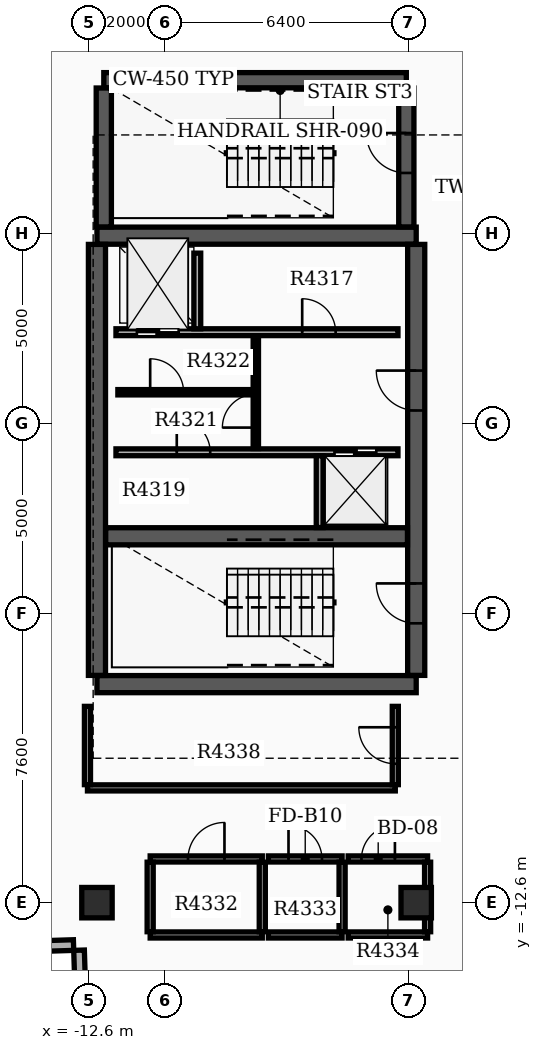
"""IFC4 building model, lengths in metres.
Left out: names, types, materials, properties, quantities, classifications, styles, units other than length and angle.
Written with IfcOpenShell. Run it as: python <this file> out.ifc"""

import sys

from ifc_helpers import new_model, si_unit, direction, frame, frame_2d, origin, origin_2d, place, context, subcontext, project, spatial, rectangle, extrude, element, fill, save


model = new_model("IFC4")
c1 = context("Model", 3, precision=1e-05, world=origin(), true_north=direction((0.0, 1.0)))
c2 = subcontext(c1, "Body", "Model", "MODEL_VIEW")
j1 = project(units=[si_unit("LENGTHUNIT", "METRE"), si_unit("PLANEANGLEUNIT", "RADIAN")], contexts=[c1])
p1 = place(None, origin())
s1 = spatial("IfcSite", under=j1, at=p1, CompositionType="ELEMENT")
p2 = place(p1, origin())
s2 = spatial("IfcBuilding", under=s1, at=p2, CompositionType="ELEMENT")
p3 = place(p2, frame((0.0, 0.0, 273.3)))
s3 = spatial("IfcBuildingStorey", under=s2, at=p3, CompositionType="ELEMENT", Elevation=273.3)
for number, where, z_axis, x_axis in (
    (1, (-12.4, -6.85, 0.0), (0.0, 0.0, 1.0), (1.0, 0.0, 0.0)),
    (2, (-12.4, 4.95, 0.0), (0.0, 0.0, 1.0), (1.0, 0.0, 0.0)),
):
    element("IfcWall", number, at=place(p3, frame(where, z_axis=z_axis, x_axis=x_axis)), inside=s3, PredefinedType="SHEAR", context=c2, shape_type="SweptSolid", body=[
        extrude(rectangle(XDim=8.4, YDim=0.45, at=frame_2d((4.2, 0.0))), origin(), (0.0, 0.0, 1.0), 3.7),
    ])
p4 = place(p3, frame((-12.4, -6.62, 0.0), z_axis=(0.0, 0.0, 1.0), x_axis=(0.0, 1.0, 0.0)))
e3 = element("IfcWall", 3, at=p4, inside=s3, PredefinedType="SHEAR", context=c2, shape_type="SweptSolid", body=[
    extrude(rectangle(XDim=11.34, YDim=0.45, at=frame_2d((5.67, 0.0))), origin(), (0.0, 0.0, 1.0), 3.7),
])
p5 = place(p3, frame((-4.0, -6.62, 0.0), z_axis=(0.0, 0.0, 1.0), x_axis=(0.0, 1.0, 0.0)))
e4 = element("IfcWall", 4, at=p5, inside=s3, PredefinedType="SHEAR", context=c2, shape_type="SweptSolid", body=[
    extrude(rectangle(XDim=11.34, YDim=0.45, at=frame_2d((5.67, 0.0))), origin(), (0.0, 0.0, 1.0), 3.7),
])
p6 = place(p5, frame((1.37, 0.0, 0.0)))
e5 = element("IfcOpeningElement", 5, at=p6, cuts=e4, PredefinedType="OPENING", context=c2, shape_type="SweptSolid", body=[
    extrude(rectangle(XDim=1.05, YDim=2.15, at=frame_2d((0.525, 1.075))), frame((0.0, 0.235, 0.0), z_axis=(0.0, -1.0, 0.0), x_axis=(1.0, 0.0, 0.0)), (0.0, 0.0, 1.0), 0.47),
])
p7 = place(p5, frame((6.97, 0.0, 0.0)))
e6 = element("IfcOpeningElement", 6, at=p7, cuts=e4, PredefinedType="OPENING", context=c2, shape_type="SweptSolid", body=[
    extrude(rectangle(XDim=1.05, YDim=2.15, at=frame_2d((0.525, 1.075))), frame((0.0, 0.235, 0.0), z_axis=(0.0, -1.0, 0.0), x_axis=(1.0, 0.0, 0.0)), (0.0, 0.0, 1.0), 0.47),
])
p8 = place(p3, frame((-12.17, -2.96, 0.0), z_axis=(0.0, 0.0, 1.0), x_axis=(1.0, 0.0, 0.0)))
e7 = element("IfcWall", 7, at=p8, inside=s3, PredefinedType="SHEAR", context=c2, shape_type="SweptSolid", body=[
    extrude(rectangle(XDim=7.94, YDim=0.45, at=frame_2d((3.97, 0.0))), origin(), (0.0, 0.0, 1.0), 3.7),
])
p9 = place(p3, frame((-12.22, 9.04, 0.0), z_axis=(0.0, 0.0, 1.0), x_axis=(1.0, 0.0, 0.0)))
e8 = element("IfcWall", 8, at=p9, inside=s3, PredefinedType="SHEAR", context=c2, shape_type="SweptSolid", body=[
    extrude(rectangle(XDim=7.96, YDim=0.4, at=frame_2d((3.98, 0.0))), origin(), (0.0, 0.0, 1.0), 3.7),
])
p10 = place(p3, frame((-12.22, 5.18, 0.0), z_axis=(0.0, 0.0, 1.0), x_axis=(0.0, 1.0, 0.0)))
e9 = element("IfcWall", 9, at=p10, inside=s3, PredefinedType="SHEAR", context=c2, shape_type="SweptSolid", body=[
    extrude(rectangle(XDim=3.655, YDim=0.4, at=frame_2d((1.828, 0.0))), origin(), (0.0, 0.0, 1.0), 3.7),
])
p11 = place(p3, frame((-4.26, 5.18, 0.0), z_axis=(0.0, 0.0, 1.0), x_axis=(0.0, 1.0, 0.0)))
e10 = element("IfcWall", 10, at=p11, inside=s3, PredefinedType="SHEAR", context=c2, shape_type="SweptSolid", body=[
    extrude(rectangle(XDim=3.655, YDim=0.4, at=frame_2d((1.828, 0.0))), origin(), (0.0, 0.0, 1.0), 3.7),
])
p12 = place(p11, frame((1.42, 0.0, 0.0)))
e11 = element("IfcOpeningElement", 11, at=p12, cuts=e10, PredefinedType="OPENING", context=c2, shape_type="SweptSolid", body=[
    extrude(rectangle(XDim=1.05, YDim=2.15, at=frame_2d((0.525, 1.075))), frame((0.0, 0.21, 0.0), z_axis=(0.0, -1.0, 0.0), x_axis=(1.0, 0.0, 0.0)), (0.0, 0.0, 1.0), 0.42),
])
for number, where, z_axis, x_axis in (
    (12, (-12.4, -12.6, 0.0), (0.0, 0.0, 1.0), (1.0, 0.0, 0.0)),
    (13, (-4.0, -12.6, 0.0), (0.0, 0.0, 1.0), (1.0, 0.0, 0.0)),
):
    element("IfcColumn", number, at=place(p3, frame(where, z_axis=z_axis, x_axis=x_axis)), inside=s3, PredefinedType="COLUMN", context=c2, shape_type="SweptSolid", body=[
        extrude(rectangle(XDim=0.8, YDim=0.8, at=origin_2d()), origin(), (0.0, 0.0, 1.0), 3.9),
    ])
p13 = place(p3, frame((-14.235, -13.754, 0.0), z_axis=(0.0, 0.0, 1.0), x_axis=(0.999506398264, 0.031415916822, 0.0)))
e14 = element("IfcWall", 14, at=p13, inside=s3, PredefinedType="STANDARD", context=c2, shape_type="SweptSolid", body=[
    extrude(rectangle(XDim=1.22, YDim=0.28, at=frame_2d((0.61, 0.0))), origin(), (0.0, 0.0, 1.0), 3.18),
])
p14 = place(p3, frame((-12.871, -13.851, 0.0), z_axis=(0.0, 0.0, 1.0), x_axis=(0.031412596484, -0.999506502621, 0.0)))
e15 = element("IfcWall", 15, at=p14, inside=s3, PredefinedType="STANDARD", context=c2, shape_type="SweptSolid", body=[
    extrude(rectangle(XDim=1.5, YDim=0.28, at=frame_2d((0.75, 0.0))), origin(), (0.0, 0.0, 1.0), 3.18),
])
p15 = place(p3, frame((-11.9, 2.41, 0.0), z_axis=(0.0, 0.0, 1.0), x_axis=(1.0, 0.0, 0.0)))
e16 = element("IfcWall", 16, at=p15, inside=s3, PredefinedType="SOLIDWALL", context=c2, shape_type="SweptSolid", body=[
    extrude(rectangle(XDim=7.42, YDim=0.18, at=frame_2d((3.71, 0.0))), origin(), (0.0, 0.0, 1.0), 3.17),
])
p16 = place(p15, frame((0.55, 0.0, 0.0)))
e17 = element("IfcOpeningElement", 17, at=p16, cuts=e16, PredefinedType="OPENING", context=c2, shape_type="SweptSolid", body=[
    extrude(rectangle(XDim=1.1, YDim=2.15, at=frame_2d((0.55, 1.075))), frame((0.0, 0.1, 0.0), z_axis=(0.0, -1.0, 0.0), x_axis=(1.0, 0.0, 0.0)), (0.0, 0.0, 1.0), 0.2),
])
p17 = place(p15, frame((4.9, 0.0, 0.0)))
e18 = element("IfcOpeningElement", 18, at=p17, cuts=e16, PredefinedType="OPENING", context=c2, shape_type="SweptSolid", body=[
    extrude(rectangle(XDim=0.88, YDim=2.1, at=frame_2d((0.44, 1.05))), frame((0.0, 0.1, 0.0), z_axis=(0.0, -1.0, 0.0), x_axis=(1.0, 0.0, 0.0)), (0.0, 0.0, 1.0), 0.2),
])
p18 = place(p3, frame((-11.9, -0.75, 0.0), z_axis=(0.0, 0.0, 1.0), x_axis=(1.0, 0.0, 0.0)))
e19 = element("IfcWall", 19, at=p18, inside=s3, PredefinedType="SOLIDWALL", context=c2, shape_type="SweptSolid", body=[
    extrude(rectangle(XDim=7.42, YDim=0.18, at=frame_2d((3.71, 0.0))), origin(), (0.0, 0.0, 1.0), 3.17),
])
p19 = place(p18, frame((5.75, 0.0, 0.0)))
e20 = element("IfcOpeningElement", 20, at=p19, cuts=e19, PredefinedType="OPENING", context=c2, shape_type="SweptSolid", body=[
    extrude(rectangle(XDim=1.1, YDim=2.15, at=frame_2d((0.55, 1.075))), frame((0.0, 0.1, 0.0), z_axis=(0.0, -1.0, 0.0), x_axis=(1.0, 0.0, 0.0)), (0.0, 0.0, 1.0), 0.2),
])
p20 = place(p18, frame((1.6, 0.0, 0.0)))
e21 = element("IfcOpeningElement", 21, at=p20, cuts=e19, PredefinedType="OPENING", context=c2, shape_type="SweptSolid", body=[
    extrude(rectangle(XDim=0.88, YDim=2.1, at=frame_2d((0.44, 1.05))), frame((0.0, 0.1, 0.0), z_axis=(0.0, -1.0, 0.0), x_axis=(1.0, 0.0, 0.0)), (0.0, 0.0, 1.0), 0.2),
])
p21 = place(p3, frame((-9.76, 2.5, 0.0), z_axis=(0.0, 0.0, 1.0), x_axis=(0.0, 1.0, 0.0)))
e22 = element("IfcWall", 22, at=p21, inside=s3, PredefinedType="SOLIDWALL", context=c2, shape_type="SweptSolid", body=[
    extrude(rectangle(XDim=1.99, YDim=0.18, at=frame_2d((0.995, 0.0))), origin(), (0.0, 0.0, 1.0), 3.17),
])
p22 = place(p3, frame((-6.54, -2.73, 0.0), z_axis=(0.0, 0.0, 1.0), x_axis=(0.0, 1.0, 0.0)))
e23 = element("IfcWall", 23, at=p22, inside=s3, PredefinedType="SOLIDWALL", context=c2, shape_type="SweptSolid", body=[
    extrude(rectangle(XDim=1.89, YDim=0.18, at=frame_2d((0.945, 0.0))), origin(), (0.0, 0.0, 1.0), 3.17),
])
p23 = place(p3, frame((-8.22, -0.65, 0.0), z_axis=(0.0, 0.0, 1.0), x_axis=(0.0, 1.0, 0.0)))
e24 = element("IfcWall", 24, at=p23, inside=s3, PredefinedType="SOLIDWALL", context=c2, shape_type="SweptSolid", body=[
    extrude(rectangle(XDim=2.96, YDim=0.14, at=frame_2d((1.48, 0.0))), origin(), (0.0, 0.0, 1.0), 3.17),
])
p24 = place(p23, frame((0.55, 0.0, 0.0)))
e25 = element("IfcOpeningElement", 25, at=p24, cuts=e24, PredefinedType="OPENING", context=c2, shape_type="SweptSolid", body=[
    extrude(rectangle(XDim=0.88, YDim=2.1, at=frame_2d((0.44, 1.05))), frame((0.0, 0.08, 0.0), z_axis=(0.0, -1.0, 0.0), x_axis=(1.0, 0.0, 0.0)), (0.0, 0.0, 1.0), 0.16),
])
p25 = place(p3, frame((-11.85, 0.83, 0.0), z_axis=(0.0, 0.0, 1.0), x_axis=(1.0, 0.0, 0.0)))
e26 = element("IfcWall", 26, at=p25, inside=s3, PredefinedType="PARTITIONING", context=c2, shape_type="SweptSolid", body=[
    extrude(rectangle(XDim=3.552, YDim=0.14, at=frame_2d((1.776, 0.0))), origin(), (0.0, 0.0, 1.0), 3.17),
])
p26 = place(p25, frame((0.85, 0.0, 0.0)))
e27 = element("IfcOpeningElement", 27, at=p26, cuts=e26, PredefinedType="OPENING", context=c2, shape_type="SweptSolid", body=[
    extrude(rectangle(XDim=0.88, YDim=2.1, at=frame_2d((0.44, 1.05))), frame((0.0, 0.08, 0.0), z_axis=(0.0, -1.0, 0.0), x_axis=(1.0, 0.0, 0.0)), (0.0, 0.0, 1.0), 0.16),
])
p27 = place(p3, frame((-11.0, -13.45, 0.0), z_axis=(0.0, 0.0, 1.0), x_axis=(1.0, 0.0, 0.0)))
e28 = element("IfcWall", 28, at=p27, inside=s3, PredefinedType="PARTITIONING", context=c2, shape_type="SweptSolid", body=[
    extrude(rectangle(XDim=2.95, YDim=0.16, at=frame_2d((1.475, 0.0))), origin(), (0.0, 0.0, 1.0), 3.17),
])
p28 = place(p3, frame((-11.0, -11.45, 0.0), z_axis=(0.0, 0.0, 1.0), x_axis=(1.0, 0.0, 0.0)))
e29 = element("IfcWall", 29, at=p28, inside=s3, PredefinedType="PARTITIONING", context=c2, shape_type="SweptSolid", body=[
    extrude(rectangle(XDim=2.95, YDim=0.16, at=frame_2d((1.475, 0.0))), origin(), (0.0, 0.0, 1.0), 3.17),
])
p29 = place(p28, frame((0.995, 0.0, 0.0)))
e30 = element("IfcOpeningElement", 30, at=p29, cuts=e29, PredefinedType="OPENING", context=c2, shape_type="SweptSolid", body=[
    extrude(rectangle(XDim=0.96, YDim=2.15, at=frame_2d((0.48, 1.075))), frame((0.0, 0.09, 0.0), z_axis=(0.0, -1.0, 0.0), x_axis=(1.0, 0.0, 0.0)), (0.0, 0.0, 1.0), 0.18),
])
for number, where, z_axis, x_axis in (
    (31, (-11.0, -13.365, 0.0), (0.0, 0.0, 1.0), (0.0, 1.0, 0.0)),
    (32, (-8.05, -13.365, 0.0), (0.0, 0.0, 1.0), (0.0, 1.0, 0.0)),
):
    element("IfcWall", number, at=place(p3, frame(where, z_axis=z_axis, x_axis=x_axis)), inside=s3, PredefinedType="PARTITIONING", context=c2, shape_type="SweptSolid", body=[
        extrude(rectangle(XDim=1.83, YDim=0.16, at=frame_2d((0.915, 0.0))), origin(), (0.0, 0.0, 1.0), 3.17),
    ])
p30 = place(p3, frame((-7.89, -13.45, 0.0), z_axis=(0.0, 0.0, 1.0), x_axis=(1.0, 0.0, 0.0)))
e33 = element("IfcWall", 33, at=p30, inside=s3, PredefinedType="PARTITIONING", context=c2, shape_type="SweptSolid", body=[
    extrude(rectangle(XDim=1.94, YDim=0.16, at=frame_2d((0.97, 0.0))), origin(), (0.0, 0.0, 1.0), 3.17),
])
p31 = place(p3, frame((-7.89, -11.45, 0.0), z_axis=(0.0, 0.0, 1.0), x_axis=(1.0, 0.0, 0.0)))
e34 = element("IfcWall", 34, at=p31, inside=s3, PredefinedType="PARTITIONING", context=c2, shape_type="SweptSolid", body=[
    extrude(rectangle(XDim=1.94, YDim=0.16, at=frame_2d((0.97, 0.0))), origin(), (0.0, 0.0, 1.0), 3.17),
])
p32 = place(p31, frame((0.53, 0.0, 0.0)))
e35 = element("IfcOpeningElement", 35, at=p32, cuts=e34, PredefinedType="OPENING", context=c2, shape_type="SweptSolid", body=[
    extrude(rectangle(XDim=0.88, YDim=2.1, at=frame_2d((0.44, 1.05))), frame((0.0, 0.09, 0.0), z_axis=(0.0, -1.0, 0.0), x_axis=(1.0, 0.0, 0.0)), (0.0, 0.0, 1.0), 0.18),
])
p33 = place(p3, frame((-5.95, -13.365, 0.0), z_axis=(0.0, 0.0, 1.0), x_axis=(0.0, 1.0, 0.0)))
e36 = element("IfcWall", 36, at=p33, inside=s3, PredefinedType="PARTITIONING", context=c2, shape_type="SweptSolid", body=[
    extrude(rectangle(XDim=1.83, YDim=0.16, at=frame_2d((0.915, 0.0))), origin(), (0.0, 0.0, 1.0), 3.17),
])
p34 = place(p3, frame((-5.79, -13.45, 0.0), z_axis=(0.0, 0.0, 1.0), x_axis=(1.0, 0.0, 0.0)))
e37 = element("IfcWall", 37, at=p34, inside=s3, PredefinedType="PARTITIONING", context=c2, shape_type="SweptSolid", body=[
    extrude(rectangle(XDim=2.09, YDim=0.16, at=frame_2d((1.045, 0.0))), origin(), (0.0, 0.0, 1.0), 3.17),
])
p35 = place(p3, frame((-5.79, -11.45, 0.0), z_axis=(0.0, 0.0, 1.0), x_axis=(1.0, 0.0, 0.0)))
e38 = element("IfcWall", 38, at=p35, inside=s3, PredefinedType="PARTITIONING", context=c2, shape_type="SweptSolid", body=[
    extrude(rectangle(XDim=2.09, YDim=0.16, at=frame_2d((1.045, 0.0))), origin(), (0.0, 0.0, 1.0), 3.17),
])
p36 = place(p35, frame((0.35, 0.0, 0.0)))
e39 = element("IfcOpeningElement", 39, at=p36, cuts=e38, PredefinedType="OPENING", context=c2, shape_type="SweptSolid", body=[
    extrude(rectangle(XDim=0.88, YDim=2.15, at=frame_2d((0.44, 1.075))), frame((0.0, 0.09, 0.0), z_axis=(0.0, -1.0, 0.0), x_axis=(1.0, 0.0, 0.0)), (0.0, 0.0, 1.0), 0.18),
])
p37 = place(p3, frame((-3.7, -13.365, 0.0), z_axis=(0.0, 0.0, 1.0), x_axis=(0.0, 1.0, 0.0)))
e40 = element("IfcWall", 40, at=p37, inside=s3, PredefinedType="PARTITIONING", context=c2, shape_type="SweptSolid", body=[
    extrude(rectangle(XDim=1.83, YDim=0.16, at=frame_2d((0.915, 0.0))), origin(), (0.0, 0.0, 1.0), 3.17),
])
p38 = place(p3, frame((-12.65, -9.58, 0.0), z_axis=(0.0, 0.0, 1.0), x_axis=(1.0, 0.0, 0.0)))
e41 = element("IfcWall", 41, at=p38, inside=s3, PredefinedType="PARTITIONING", context=c2, shape_type="SweptSolid", body=[
    extrude(rectangle(XDim=8.1, YDim=0.16, at=frame_2d((4.05, 0.0))), origin(), (0.0, 0.0, 1.0), 3.17),
])
p39 = place(p3, frame((-12.65, -9.495, 0.0), z_axis=(0.0, 0.0, 1.0), x_axis=(0.0, 1.0, 0.0)))
e42 = element("IfcWall", 42, at=p39, inside=s3, PredefinedType="PARTITIONING", context=c2, shape_type="SweptSolid", body=[
    extrude(rectangle(XDim=2.06, YDim=0.16, at=frame_2d((1.03, 0.0))), origin(), (0.0, 0.0, 1.0), 3.17),
])
p40 = place(p3, frame((-4.55, -9.495, 0.0), z_axis=(0.0, 0.0, 1.0), x_axis=(0.0, 1.0, 0.0)))
e43 = element("IfcWall", 43, at=p40, inside=s3, PredefinedType="PARTITIONING", context=c2, shape_type="SweptSolid", body=[
    extrude(rectangle(XDim=2.06, YDim=0.16, at=frame_2d((1.03, 0.0))), origin(), (0.0, 0.0, 1.0), 3.17),
])
p41 = place(p40, frame((0.55, 0.0, 0.0)))
e44 = element("IfcOpeningElement", 44, at=p41, cuts=e43, PredefinedType="OPENING", context=c2, shape_type="SweptSolid", body=[
    extrude(rectangle(XDim=0.96, YDim=2.15, at=frame_2d((0.48, 1.075))), frame((0.0, 0.09, 0.0), z_axis=(0.0, -1.0, 0.0), x_axis=(1.0, 0.0, 0.0)), (0.0, 0.0, 1.0), 0.18),
])
p42 = place(p6, origin())
e45 = element("IfcDoor", 45, at=p42, inside=s3, OperationType="SINGLE_SWING_RIGHT", PredefinedType="DOOR", context=c2, shape_type="SweptSolid", body=[
    extrude(rectangle(XDim=1.05, YDim=2.15, at=frame_2d((0.525, 1.075))), frame((0.0, 0.025, 0.0), z_axis=(0.0, -1.0, 0.0), x_axis=(1.0, 0.0, 0.0)), (0.0, 0.0, 1.0), 0.05),
])
fill(e5, e45)
p43 = place(p7, origin())
e46 = element("IfcDoor", 46, at=p43, inside=s3, OperationType="SINGLE_SWING_RIGHT", PredefinedType="DOOR", context=c2, shape_type="SweptSolid", body=[
    extrude(rectangle(XDim=1.05, YDim=2.15, at=frame_2d((0.525, 1.075))), frame((0.0, 0.025, 0.0), z_axis=(0.0, -1.0, 0.0), x_axis=(1.0, 0.0, 0.0)), (0.0, 0.0, 1.0), 0.05),
])
fill(e6, e46)
p44 = place(p12, origin())
e47 = element("IfcDoor", 47, at=p44, inside=s3, OperationType="SINGLE_SWING_RIGHT", PredefinedType="DOOR", context=c2, shape_type="SweptSolid", body=[
    extrude(rectangle(XDim=1.05, YDim=2.15, at=frame_2d((0.525, 1.075))), frame((0.0, 0.025, 0.0), z_axis=(0.0, -1.0, 0.0), x_axis=(1.0, 0.0, 0.0)), (0.0, 0.0, 1.0), 0.05),
])
fill(e11, e47)
p45 = place(p16, origin())
e48 = element("IfcDoor", 48, at=p45, inside=s3, OperationType="DOUBLE_DOOR_SLIDING", PredefinedType="DOOR", context=c2, shape_type="SweptSolid", body=[
    extrude(rectangle(XDim=1.1, YDim=2.15, at=frame_2d((0.55, 1.075))), frame((0.0, 0.025, 0.0), z_axis=(0.0, -1.0, 0.0), x_axis=(1.0, 0.0, 0.0)), (0.0, 0.0, 1.0), 0.05),
])
fill(e17, e48)
p46 = place(p19, origin())
e49 = element("IfcDoor", 49, at=p46, inside=s3, OperationType="DOUBLE_DOOR_SLIDING", PredefinedType="DOOR", context=c2, shape_type="SweptSolid", body=[
    extrude(rectangle(XDim=1.1, YDim=2.15, at=frame_2d((0.55, 1.075))), frame((0.0, 0.025, 0.0), z_axis=(0.0, -1.0, 0.0), x_axis=(1.0, 0.0, 0.0)), (0.0, 0.0, 1.0), 0.05),
])
fill(e20, e49)
p47 = place(p17, origin())
e50 = element("IfcDoor", 50, at=p47, inside=s3, OperationType="SINGLE_SWING_LEFT", PredefinedType="DOOR", context=c2, shape_type="SweptSolid", body=[
    extrude(rectangle(XDim=0.88, YDim=2.1, at=frame_2d((0.44, 1.05))), frame((0.0, 0.025, 0.0), z_axis=(0.0, -1.0, 0.0), x_axis=(1.0, 0.0, 0.0)), (0.0, 0.0, 1.0), 0.05),
])
fill(e18, e50)
p48 = place(p20, origin())
e51 = element("IfcDoor", 51, at=p48, inside=s3, OperationType="SINGLE_SWING_LEFT", PredefinedType="DOOR", context=c2, shape_type="SweptSolid", body=[
    extrude(rectangle(XDim=0.88, YDim=2.1, at=frame_2d((0.44, 1.05))), frame((0.0, 0.025, 0.0), z_axis=(0.0, -1.0, 0.0), x_axis=(1.0, 0.0, 0.0)), (0.0, 0.0, 1.0), 0.05),
])
fill(e21, e51)
p49 = place(p24, origin())
e52 = element("IfcDoor", 52, at=p49, inside=s3, OperationType="SINGLE_SWING_LEFT", PredefinedType="DOOR", context=c2, shape_type="SweptSolid", body=[
    extrude(rectangle(XDim=0.88, YDim=2.1, at=frame_2d((0.44, 1.05))), frame((0.0, 0.025, 0.0), z_axis=(0.0, -1.0, 0.0), x_axis=(1.0, 0.0, 0.0)), (0.0, 0.0, 1.0), 0.05),
])
fill(e25, e52)
p50 = place(p26, origin())
e53 = element("IfcDoor", 53, at=p50, inside=s3, OperationType="SINGLE_SWING_LEFT", PredefinedType="DOOR", context=c2, shape_type="SweptSolid", body=[
    extrude(rectangle(XDim=0.88, YDim=2.1, at=frame_2d((0.44, 1.05))), frame((0.0, 0.025, 0.0), z_axis=(0.0, -1.0, 0.0), x_axis=(1.0, 0.0, 0.0)), (0.0, 0.0, 1.0), 0.05),
])
fill(e27, e53)
p51 = place(p29, origin())
e54 = element("IfcDoor", 54, at=p51, inside=s3, OperationType="SINGLE_SWING_RIGHT", PredefinedType="DOOR", context=c2, shape_type="SweptSolid", body=[
    extrude(rectangle(XDim=0.96, YDim=2.15, at=frame_2d((0.48, 1.075))), frame((0.0, 0.025, 0.0), z_axis=(0.0, -1.0, 0.0), x_axis=(1.0, 0.0, 0.0)), (0.0, 0.0, 1.0), 0.05),
])
fill(e30, e54)
p52 = place(p32, origin())
e55 = element("IfcDoor", 55, at=p52, inside=s3, OperationType="SINGLE_SWING_LEFT", PredefinedType="DOOR", context=c2, shape_type="SweptSolid", body=[
    extrude(rectangle(XDim=0.88, YDim=2.1, at=frame_2d((0.44, 1.05))), frame((0.0, 0.025, 0.0), z_axis=(0.0, -1.0, 0.0), x_axis=(1.0, 0.0, 0.0)), (0.0, 0.0, 1.0), 0.05),
])
fill(e35, e55)
p53 = place(p36, origin())
e56 = element("IfcDoor", 56, at=p53, inside=s3, OperationType="SINGLE_SWING_RIGHT", PredefinedType="DOOR", context=c2, shape_type="SweptSolid", body=[
    extrude(rectangle(XDim=0.88, YDim=2.15, at=frame_2d((0.44, 1.075))), frame((0.0, 0.025, 0.0), z_axis=(0.0, -1.0, 0.0), x_axis=(1.0, 0.0, 0.0)), (0.0, 0.0, 1.0), 0.05),
])
fill(e39, e56)
p54 = place(p41, origin())
e57 = element("IfcDoor", 57, at=p54, inside=s3, OperationType="SINGLE_SWING_RIGHT", PredefinedType="DOOR", context=c2, shape_type="SweptSolid", body=[
    extrude(rectangle(XDim=0.96, YDim=2.15, at=frame_2d((0.48, 1.075))), frame((0.0, 0.025, 0.0), z_axis=(0.0, -1.0, 0.0), x_axis=(1.0, 0.0, 0.0)), (0.0, 0.0, 1.0), 0.05),
])
fill(e44, e57)
save(model, sys.argv[1])
